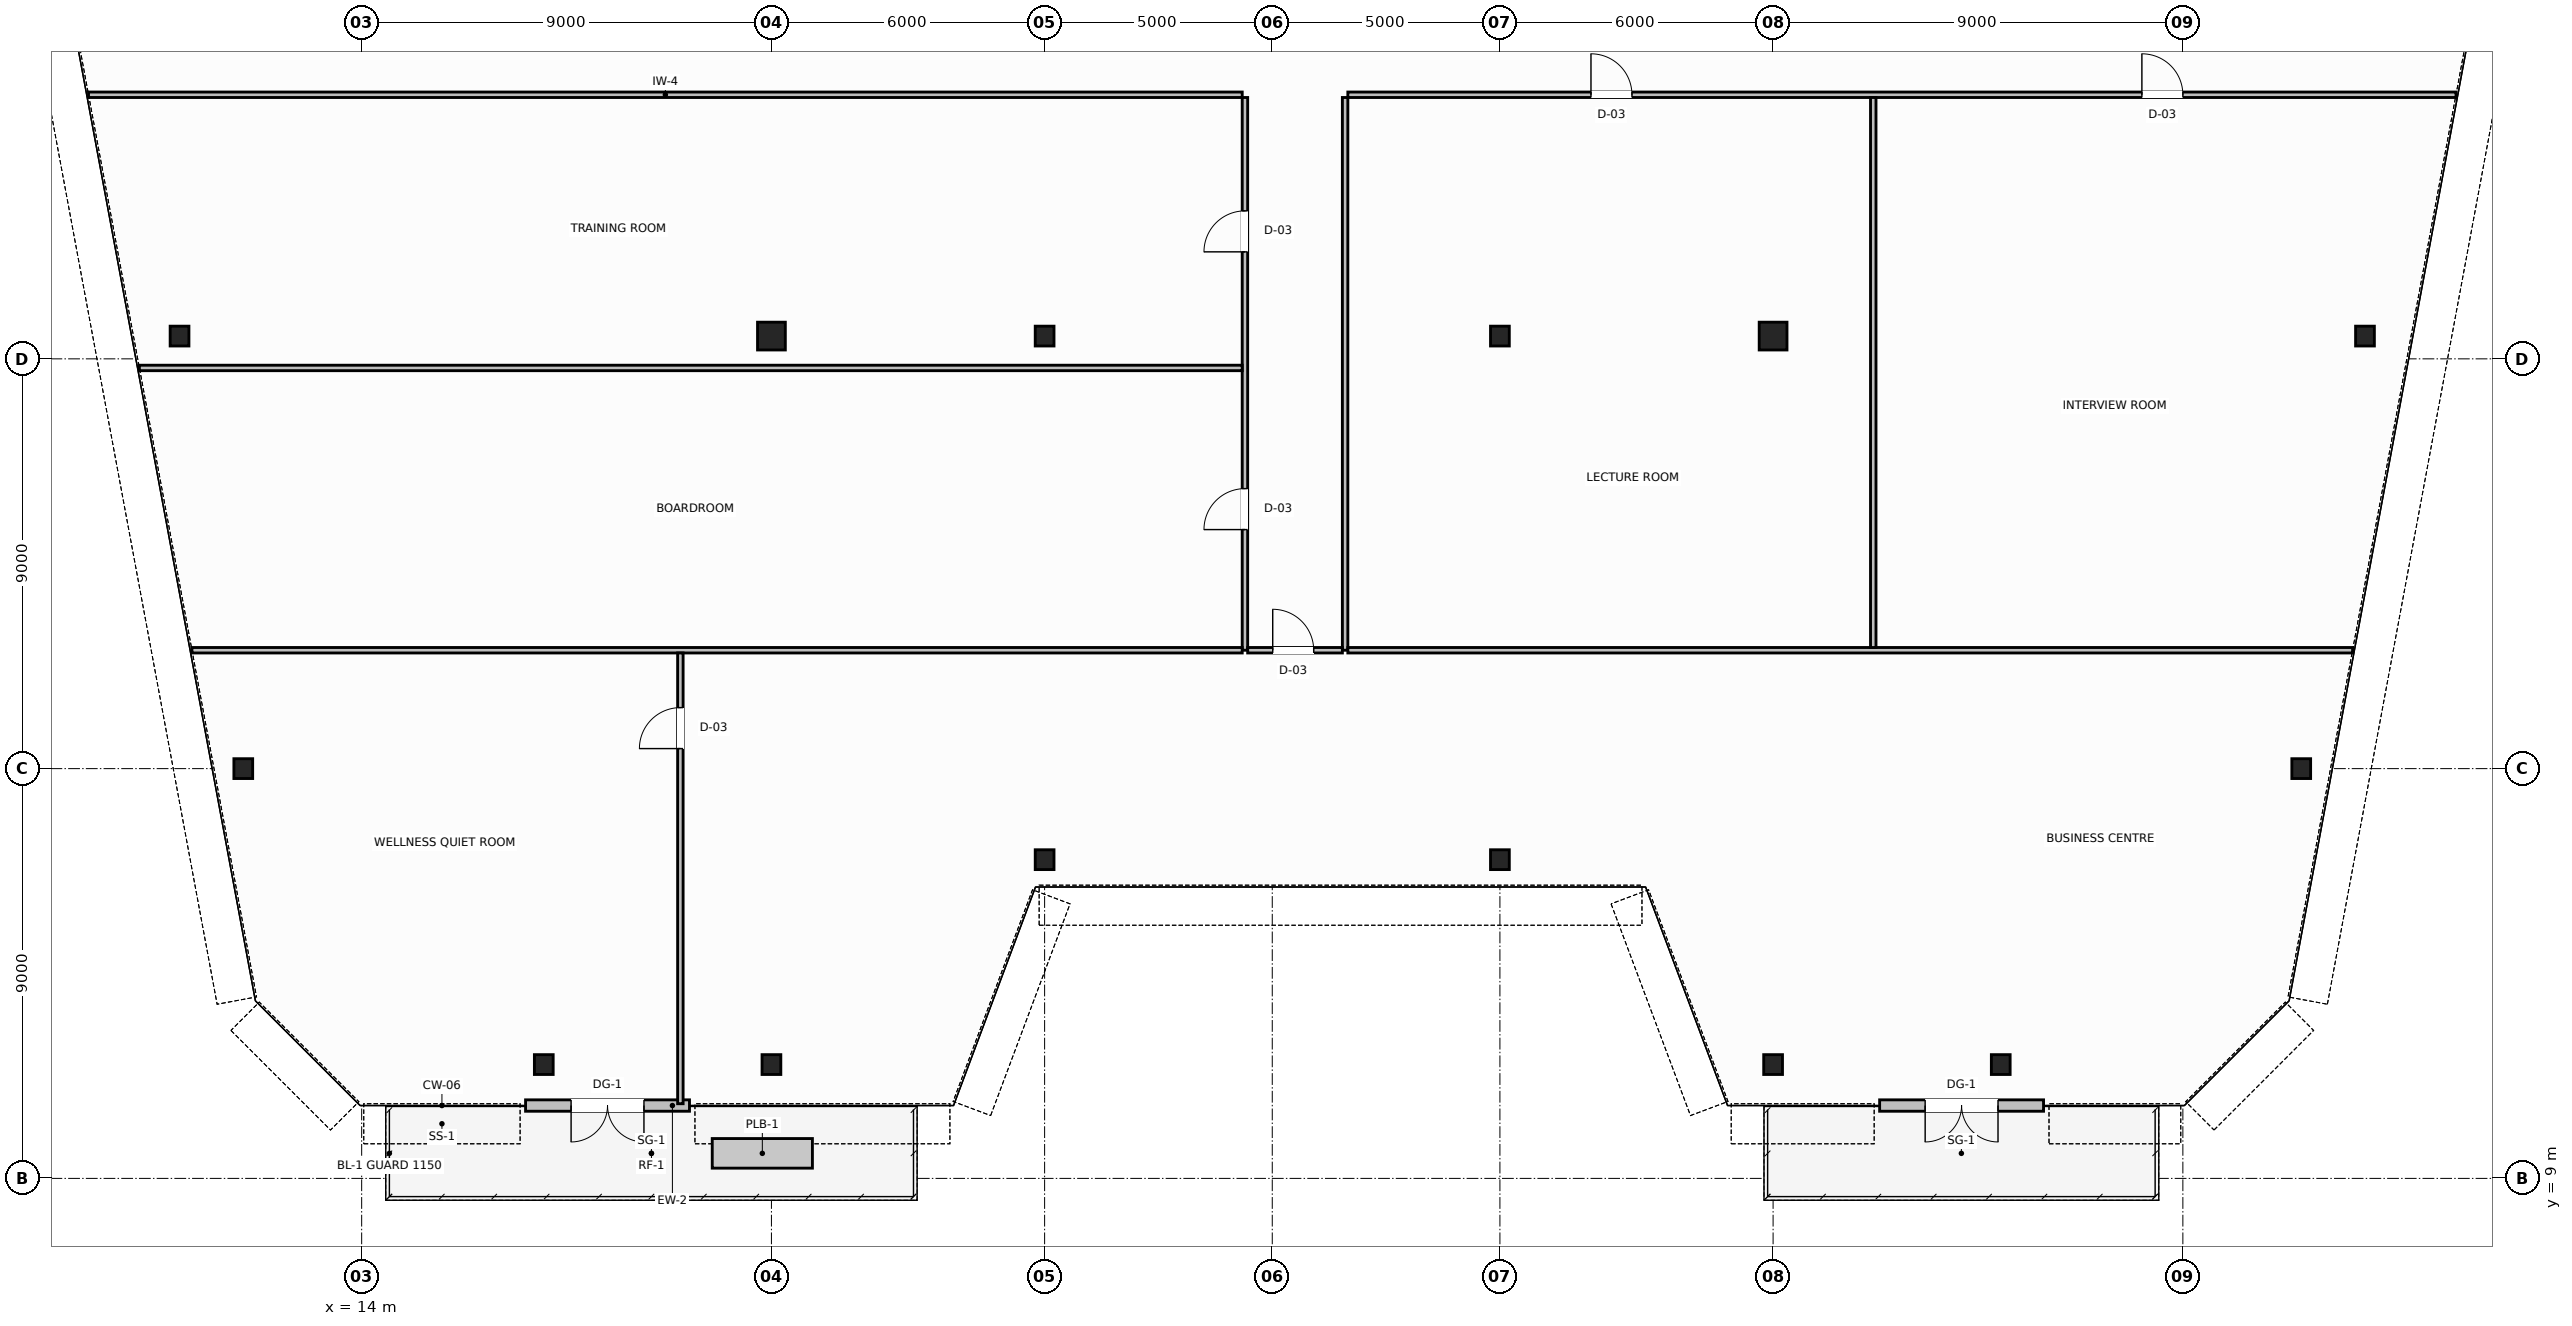
"""IFC4 building model, lengths in metres.
Left out: names, types, materials, properties, quantities, classifications, styles, units other than length and angle.
Written with IfcOpenShell. Run it as: python <this file> out.ifc"""

import sys

from ifc_helpers import new_model, si_unit, direction, frame, frame_2d, origin, origin_2d, place, context, subcontext, project, spatial, rectangle, hollow_circle, i_section, extrude, source, transform, mapped, element, fill, save


model = new_model("IFC4")
c1 = context("Model", 3, precision=1e-05, world=origin(), true_north=direction((0.0, 1.0)))
c2 = subcontext(c1, "Body", "Model", "MODEL_VIEW")
j1 = project(units=[si_unit("LENGTHUNIT", "METRE"), si_unit("PLANEANGLEUNIT", "RADIAN")], contexts=[c1])
p1 = place(None, origin())
s1 = spatial("IfcSite", under=j1, at=p1, CompositionType="ELEMENT")
p2 = place(p1, origin())
s2 = spatial("IfcBuilding", under=s1, at=p2, CompositionType="ELEMENT")
p3 = place(p2, frame((0.0, 0.0, 238.4)))
s3 = spatial("IfcBuildingStorey", under=s2, at=p3, CompositionType="ELEMENT", Elevation=238.4)
m1 = source(origin(), c2, "Body", "SweptSolid", [
    extrude(i_section(OverallWidth=0.412, OverallDepth=0.435, WebThickness=0.036, FlangeThickness=0.05, FilletRadius=0.015, at=origin_2d()), origin(), (0.0, 0.0, 1.0), 3.8),
])
for number, where, z_axis, x_axis in (
    (1, (10.0, 27.5, 0.0), (0.0, 0.0, 1.0), (1.0, 0.0, 0.0)),
    (2, (11.4, 18.0, 0.0), (0.0, 0.0, 1.0), (1.0, 0.0, 0.0)),
    (3, (58.0, 27.5, 0.0), (0.0, 0.0, 1.0), (1.0, 0.0, 0.0)),
    (4, (56.6, 18.0, 0.0), (0.0, 0.0, 1.0), (1.0, 0.0, 0.0)),
):
    element("IfcColumn", number, at=place(p3, frame(where, z_axis=z_axis, x_axis=x_axis)), inside=s3, PredefinedType="COLUMN", context=c2, shape_type="MappedRepresentation", body=[
        mapped(m1, transform((0.0, 0.0, 0.0), scale=1.0)),
    ])
m2 = source(origin(), c2, "Body", "SweptSolid", [
    extrude(hollow_circle(Radius=0.305, WallThickness=0.03, at=origin_2d()), origin(), (0.0, 0.0, 1.0), 3.8),
])
p4 = place(p3, frame((23.0, 27.5, 0.0), z_axis=(0.0, 0.0, 1.0), x_axis=(1.0, 0.0, 0.0)))
e5 = element("IfcColumn", 5, at=p4, inside=s3, PredefinedType="COLUMN", context=c2, shape_type="MappedRepresentation", body=[
    mapped(m2, transform((0.0, 0.0, 0.0), scale=1.0)),
])
m3 = source(origin(), c2, "Body", "SweptSolid", [
    extrude(i_section(OverallWidth=0.412, OverallDepth=0.435, WebThickness=0.036, FlangeThickness=0.05, FilletRadius=0.015, at=origin_2d()), origin(), (0.0, 0.0, 1.0), 3.8),
])
for number, where, z_axis, x_axis in (
    (6, (29.0, 27.5, 0.0), (0.0, 0.0, 1.0), (1.0, 0.0, 0.0)),
    (7, (39.0, 27.5, 0.0), (0.0, 0.0, 1.0), (1.0, 0.0, 0.0)),
):
    element("IfcColumn", number, at=place(p3, frame(where, z_axis=z_axis, x_axis=x_axis)), inside=s3, PredefinedType="COLUMN", context=c2, shape_type="MappedRepresentation", body=[
        mapped(m3, transform((0.0, 0.0, 0.0), scale=1.0)),
    ])
p5 = place(p3, frame((45.0, 27.5, 0.0), z_axis=(0.0, 0.0, 1.0), x_axis=(1.0, 0.0, 0.0)))
e8 = element("IfcColumn", 8, at=p5, inside=s3, PredefinedType="COLUMN", context=c2, shape_type="MappedRepresentation", body=[
    mapped(m2, transform((0.0, 0.0, 0.0), scale=1.0)),
])
m4 = source(origin(), c2, "Body", "SweptSolid", [
    extrude(i_section(OverallWidth=0.412, OverallDepth=0.435, WebThickness=0.036, FlangeThickness=0.05, FilletRadius=0.015, at=origin_2d()), origin(), (0.0, 0.0, 1.0), 4.02),
])
for number, where, z_axis, x_axis in (
    (9, (18.0, 11.5, -0.22), (0.0, 0.0, 1.0), (1.0, 0.0, 0.0)),
    (10, (23.0, 11.5, -0.22), (0.0, 0.0, 1.0), (1.0, 0.0, 0.0)),
    (11, (29.0, 16.0, -0.22), (0.0, 0.0, 1.0), (1.0, 0.0, 0.0)),
    (12, (39.0, 16.0, -0.22), (0.0, 0.0, 1.0), (1.0, 0.0, 0.0)),
    (13, (45.0, 11.5, -0.22), (0.0, 0.0, 1.0), (1.0, 0.0, 0.0)),
    (14, (50.0, 11.5, -0.22), (0.0, 0.0, 1.0), (1.0, 0.0, 0.0)),
):
    element("IfcColumn", number, at=place(p3, frame(where, z_axis=z_axis, x_axis=x_axis)), inside=s3, PredefinedType="COLUMN", context=c2, shape_type="MappedRepresentation", body=[
        mapped(m4, transform((0.0, 0.0, 0.0), scale=1.0)),
    ])
p6 = place(p3, frame((21.2, 10.6, 0.0), z_axis=(0.0, 0.0, 1.0), x_axis=(-1.0, 0.0, 0.0)))
e15 = element("IfcWall", 15, at=p6, inside=s3, PredefinedType="STANDARD", context=c2, shape_type="SweptSolid", body=[
    extrude(rectangle(XDim=3.6, YDim=0.25, at=frame_2d((1.8, 0.0))), origin(), (0.0, 0.0, 1.0), 3.58),
])
p7 = place(p6, frame((1.0, 0.0, 0.0)))
e16 = element("IfcOpeningElement", 16, at=p7, cuts=e15, PredefinedType="OPENING", context=c2, shape_type="SweptSolid", body=[
    extrude(rectangle(XDim=1.6, YDim=2.3, at=frame_2d((0.8, 1.15))), frame((0.0, 0.135, 0.0), z_axis=(0.0, -1.0, 0.0), x_axis=(1.0, 0.0, 0.0)), (0.0, 0.0, 1.0), 0.27),
])
p8 = place(p3, frame((21.7, 9.55, 0.0), z_axis=(0.0, 0.0, 1.0), x_axis=(1.0, 0.0, 0.0)))
e17 = element("IfcWall", 17, at=p8, inside=s3, PredefinedType="PARAPET", context=c2, shape_type="SweptSolid", body=[
    extrude(rectangle(XDim=2.2, YDim=0.65, at=frame_2d((1.1, 0.0))), origin(), (0.0, 0.0, 1.0), 0.65),
])
p9 = place(p3, frame((50.94, 10.6, 0.0), z_axis=(0.0, 0.0, 1.0), x_axis=(-1.0, 0.0, 0.0)))
e18 = element("IfcWall", 18, at=p9, inside=s3, PredefinedType="STANDARD", context=c2, shape_type="SweptSolid", body=[
    extrude(rectangle(XDim=3.6, YDim=0.25, at=frame_2d((1.8, 0.0))), origin(), (0.0, 0.0, 1.0), 3.58),
])
p10 = place(p9, frame((1.0, 0.0, 0.0)))
e19 = element("IfcOpeningElement", 19, at=p10, cuts=e18, PredefinedType="OPENING", context=c2, shape_type="SweptSolid", body=[
    extrude(rectangle(XDim=1.6, YDim=2.3, at=frame_2d((0.8, 1.15))), frame((0.0, 0.135, 0.0), z_axis=(0.0, -1.0, 0.0), x_axis=(1.0, 0.0, 0.0)), (0.0, 0.0, 1.0), 0.27),
])
p11 = place(p3, frame((8.0, 32.8, 0.0), z_axis=(0.0, 0.0, 1.0), x_axis=(1.0, 0.0, 0.0)))
e20 = element("IfcWall", 20, at=p11, inside=s3, PredefinedType="PARTITIONING", context=c2, shape_type="SweptSolid", body=[
    extrude(rectangle(XDim=25.34, YDim=0.12, at=frame_2d((12.67, 0.0))), origin(), (0.0, 0.0, 1.0), 3.58),
])
p12 = place(p3, frame((35.66, 32.8, 0.0), z_axis=(0.0, 0.0, 1.0), x_axis=(1.0, 0.0, 0.0)))
e21 = element("IfcWall", 21, at=p12, inside=s3, PredefinedType="PARTITIONING", context=c2, shape_type="SweptSolid", body=[
    extrude(rectangle(XDim=24.34, YDim=0.12, at=frame_2d((12.17, 0.0))), origin(), (0.0, 0.0, 1.0), 3.58),
])
p13 = place(p12, frame((5.34, 0.0, 0.0)))
e22 = element("IfcOpeningElement", 22, at=p13, cuts=e21, PredefinedType="OPENING", context=c2, shape_type="SweptSolid", body=[
    extrude(rectangle(XDim=0.9, YDim=2.15, at=frame_2d((0.45, 1.075))), frame((0.0, 0.07, 0.0), z_axis=(0.0, -1.0, 0.0), x_axis=(1.0, 0.0, 0.0)), (0.0, 0.0, 1.0), 0.14),
])
p14 = place(p12, frame((17.44, 0.0, 0.0)))
e23 = element("IfcOpeningElement", 23, at=p14, cuts=e21, PredefinedType="OPENING", context=c2, shape_type="SweptSolid", body=[
    extrude(rectangle(XDim=0.9, YDim=2.15, at=frame_2d((0.45, 1.075))), frame((0.0, 0.07, 0.0), z_axis=(0.0, -1.0, 0.0), x_axis=(1.0, 0.0, 0.0)), (0.0, 0.0, 1.0), 0.14),
])
p15 = place(p3, frame((33.4, 20.6, 0.0), z_axis=(0.0, 0.0, 1.0), x_axis=(0.0, 1.0, 0.0)))
e24 = element("IfcWall", 24, at=p15, inside=s3, PredefinedType="PARTITIONING", context=c2, shape_type="SweptSolid", body=[
    extrude(rectangle(XDim=12.14, YDim=0.12, at=frame_2d((6.07, 0.0))), origin(), (0.0, 0.0, 1.0), 3.58),
])
p16 = place(p15, frame((2.65, 0.0, 0.0)))
e25 = element("IfcOpeningElement", 25, at=p16, cuts=e24, PredefinedType="OPENING", context=c2, shape_type="SweptSolid", body=[
    extrude(rectangle(XDim=0.9, YDim=2.15, at=frame_2d((0.45, 1.075))), frame((0.0, 0.07, 0.0), z_axis=(0.0, -1.0, 0.0), x_axis=(1.0, 0.0, 0.0)), (0.0, 0.0, 1.0), 0.14),
])
p17 = place(p15, frame((8.75, 0.0, 0.0)))
e26 = element("IfcOpeningElement", 26, at=p17, cuts=e24, PredefinedType="OPENING", context=c2, shape_type="SweptSolid", body=[
    extrude(rectangle(XDim=0.9, YDim=2.15, at=frame_2d((0.45, 1.075))), frame((0.0, 0.07, 0.0), z_axis=(0.0, -1.0, 0.0), x_axis=(1.0, 0.0, 0.0)), (0.0, 0.0, 1.0), 0.14),
])
p18 = place(p3, frame((35.6, 20.6, 0.0), z_axis=(0.0, 0.0, 1.0), x_axis=(0.0, 1.0, 0.0)))
e27 = element("IfcWall", 27, at=p18, inside=s3, PredefinedType="PARTITIONING", context=c2, shape_type="SweptSolid", body=[
    extrude(rectangle(XDim=12.14, YDim=0.12, at=frame_2d((6.07, 0.0))), origin(), (0.0, 0.0, 1.0), 3.58),
])
p19 = place(p3, frame((33.46, 20.6, 0.0), z_axis=(0.0, 0.0, 1.0), x_axis=(1.0, 0.0, 0.0)))
e28 = element("IfcWall", 28, at=p19, inside=s3, PredefinedType="PARTITIONING", context=c2, shape_type="SweptSolid", body=[
    extrude(rectangle(XDim=2.08, YDim=0.12, at=frame_2d((1.04, 0.0))), origin(), (0.0, 0.0, 1.0), 3.58),
])
p20 = place(p19, frame((0.55, 0.0, 0.0)))
e29 = element("IfcOpeningElement", 29, at=p20, cuts=e28, PredefinedType="OPENING", context=c2, shape_type="SweptSolid", body=[
    extrude(rectangle(XDim=0.9, YDim=2.15, at=frame_2d((0.45, 1.075))), frame((0.0, 0.07, 0.0), z_axis=(0.0, -1.0, 0.0), x_axis=(1.0, 0.0, 0.0)), (0.0, 0.0, 1.0), 0.14),
])
p21 = place(p3, frame((10.272, 20.6, 0.0), z_axis=(0.0, 0.0, 1.0), x_axis=(1.0, 0.0, 0.0)))
e30 = element("IfcWall", 30, at=p21, inside=s3, PredefinedType="PARTITIONING", context=c2, shape_type="SweptSolid", body=[
    extrude(rectangle(XDim=23.068, YDim=0.12, at=frame_2d((11.534, 0.0))), origin(), (0.0, 0.0, 1.0), 3.58),
])
p22 = place(p3, frame((35.66, 20.6, 0.0), z_axis=(0.0, 0.0, 1.0), x_axis=(1.0, 0.0, 0.0)))
e31 = element("IfcWall", 31, at=p22, inside=s3, PredefinedType="PARTITIONING", context=c2, shape_type="SweptSolid", body=[
    extrude(rectangle(XDim=22.068, YDim=0.12, at=frame_2d((11.034, 0.0))), origin(), (0.0, 0.0, 1.0), 3.58),
])
p23 = place(p3, frame((21.0, 10.64, 0.0), z_axis=(0.0, 0.0, 1.0), x_axis=(0.0, 1.0, 0.0)))
e32 = element("IfcWall", 32, at=p23, inside=s3, PredefinedType="PARTITIONING", context=c2, shape_type="SweptSolid", body=[
    extrude(rectangle(XDim=9.9, YDim=0.12, at=frame_2d((4.95, 0.0))), origin(), (0.0, 0.0, 1.0), 3.58),
])
p24 = place(p23, frame((7.8, 0.0, 0.0)))
e33 = element("IfcOpeningElement", 33, at=p24, cuts=e32, PredefinedType="OPENING", context=c2, shape_type="SweptSolid", body=[
    extrude(rectangle(XDim=0.9, YDim=2.15, at=frame_2d((0.45, 1.075))), frame((0.0, 0.07, 0.0), z_axis=(0.0, -1.0, 0.0), x_axis=(1.0, 0.0, 0.0)), (0.0, 0.0, 1.0), 0.14),
])
p25 = place(p3, frame((9.118, 26.8, 0.0), z_axis=(0.0, 0.0, 1.0), x_axis=(1.0, 0.0, 0.0)))
e34 = element("IfcWall", 34, at=p25, inside=s3, PredefinedType="PARTITIONING", context=c2, shape_type="SweptSolid", body=[
    extrude(rectangle(XDim=24.222, YDim=0.12, at=frame_2d((12.111, 0.0))), origin(), (0.0, 0.0, 1.0), 3.58),
])
p26 = place(p3, frame((47.2, 20.66, 0.0), z_axis=(0.0, 0.0, 1.0), x_axis=(0.0, 1.0, 0.0)))
e35 = element("IfcWall", 35, at=p26, inside=s3, PredefinedType="PARTITIONING", context=c2, shape_type="SweptSolid", body=[
    extrude(rectangle(XDim=12.08, YDim=0.12, at=frame_2d((6.04, 0.0))), origin(), (0.0, 0.0, 1.0), 3.58),
])
m5 = source(origin(), c2, "Body", "SweptSolid", [
    extrude(rectangle(XDim=1.6, YDim=2.3, at=frame_2d((0.8, 1.15))), frame((0.0, 0.025, 0.0), z_axis=(0.0, -1.0, 0.0), x_axis=(1.0, 0.0, 0.0)), (0.0, 0.0, 1.0), 0.05),
])
p27 = place(p7, origin())
e36 = element("IfcDoor", 36, at=p27, inside=s3, OperationType="DOUBLE_DOOR_SINGLE_SWING", PredefinedType="DOOR", context=c2, shape_type="MappedRepresentation", body=[
    mapped(m5, transform((0.0, 0.0, 0.0), scale=1.0)),
])
fill(e16, e36)
p28 = place(p10, origin())
e37 = element("IfcDoor", 37, at=p28, inside=s3, OperationType="DOUBLE_DOOR_SINGLE_SWING", PredefinedType="DOOR", context=c2, shape_type="MappedRepresentation", body=[
    mapped(m5, transform((0.0, 0.0, 0.0), scale=1.0)),
])
fill(e19, e37)
m6 = source(origin(), c2, "Body", "SweptSolid", [
    extrude(rectangle(XDim=0.9, YDim=2.15, at=frame_2d((0.45, 1.075))), frame((0.0, 0.025, 0.0), z_axis=(0.0, -1.0, 0.0), x_axis=(1.0, 0.0, 0.0)), (0.0, 0.0, 1.0), 0.05),
])
p29 = place(p24, origin())
e38 = element("IfcDoor", 38, at=p29, inside=s3, OperationType="SINGLE_SWING_RIGHT", PredefinedType="DOOR", context=c2, shape_type="MappedRepresentation", body=[
    mapped(m6, transform((0.0, 0.0, 0.0), scale=1.0)),
])
fill(e33, e38)
p30 = place(p20, origin())
e39 = element("IfcDoor", 39, at=p30, inside=s3, OperationType="SINGLE_SWING_LEFT", PredefinedType="DOOR", context=c2, shape_type="MappedRepresentation", body=[
    mapped(m6, transform((0.0, 0.0, 0.0), scale=1.0)),
])
fill(e29, e39)
p31 = place(p16, origin())
e40 = element("IfcDoor", 40, at=p31, inside=s3, OperationType="SINGLE_SWING_LEFT", PredefinedType="DOOR", context=c2, shape_type="MappedRepresentation", body=[
    mapped(m6, transform((0.0, 0.0, 0.0), scale=1.0)),
])
fill(e25, e40)
p32 = place(p17, origin())
e41 = element("IfcDoor", 41, at=p32, inside=s3, OperationType="SINGLE_SWING_RIGHT", PredefinedType="DOOR", context=c2, shape_type="MappedRepresentation", body=[
    mapped(m6, transform((0.0, 0.0, 0.0), scale=1.0)),
])
fill(e26, e41)
p33 = place(p13, origin())
e42 = element("IfcDoor", 42, at=p33, inside=s3, OperationType="SINGLE_SWING_RIGHT", PredefinedType="DOOR", context=c2, shape_type="MappedRepresentation", body=[
    mapped(m6, transform((0.0, 0.0, 0.0), scale=1.0)),
])
fill(e22, e42)
p34 = place(p14, origin())
e43 = element("IfcDoor", 43, at=p34, inside=s3, OperationType="SINGLE_SWING_LEFT", PredefinedType="DOOR", context=c2, shape_type="MappedRepresentation", body=[
    mapped(m6, transform((0.0, 0.0, 0.0), scale=1.0)),
])
fill(e23, e43)
save(model, sys.argv[1])
